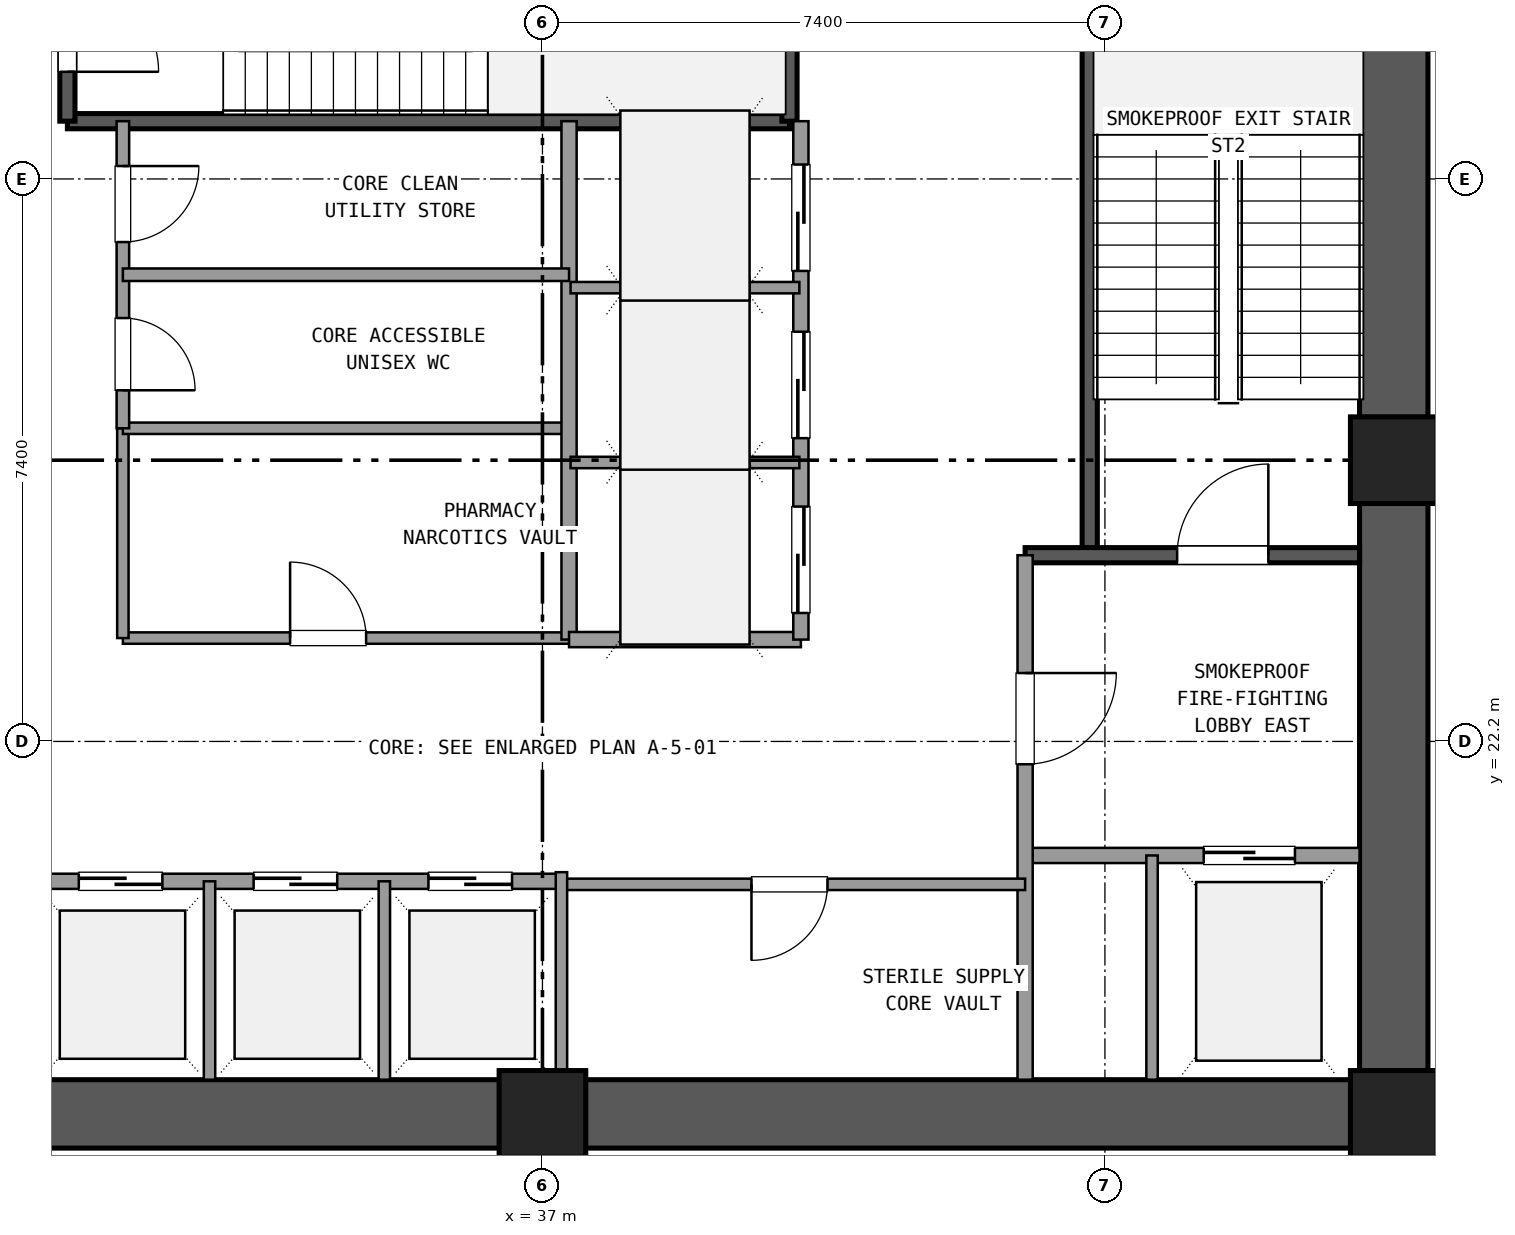
"""IFC4 building model, lengths in metres.
Left out: names, types, materials, properties, quantities, classifications, styles, units other than length and angle.
Written with IfcOpenShell. Run it as: python <this file> out.ifc"""

import sys

from ifc_helpers import new_model, si_unit, direction, frame, frame_2d, origin, origin_2d, place, context, subcontext, project, spatial, rectangle, extrude, element, fill, save


model = new_model("IFC4")
c1 = context("Model", 3, precision=1e-05, world=origin(), true_north=direction((0.0, 1.0)))
c2 = subcontext(c1, "Body", "Model", "MODEL_VIEW")
j1 = project(units=[si_unit("LENGTHUNIT", "METRE"), si_unit("PLANEANGLEUNIT", "RADIAN")], contexts=[c1])
p1 = place(None, origin())
s1 = spatial("IfcSite", under=j1, at=p1, CompositionType="ELEMENT")
p2 = place(p1, origin())
s2 = spatial("IfcBuilding", under=s1, at=p2, CompositionType="ELEMENT")
p3 = place(p2, frame((0.0, 0.0, -9.72)))
s3 = spatial("IfcBuildingStorey", under=s2, at=p3, CompositionType="ELEMENT", Elevation=-9.72)
for number, where, z_axis, x_axis in (
    (1, (37.0, 17.3, 0.0), (0.0, 0.0, 1.0), (1.0, 0.0, 0.0)),
    (2, (48.2, 17.3, 0.0), (0.0, 0.0, 1.0), (1.0, 0.0, 0.0)),
    (3, (48.2, 25.9, 0.0), (0.0, 0.0, 1.0), (1.0, 0.0, 0.0)),
):
    element("IfcColumn", number, at=place(p3, frame(where, z_axis=z_axis, x_axis=x_axis)), inside=s3, PredefinedType="COLUMN", context=c2, shape_type="SweptSolid", body=[
        extrude(rectangle(XDim=1.14, YDim=1.14, at=origin_2d()), origin(), (0.0, 0.0, 1.0), 4.86),
    ])
for number, where, z_axis, x_axis in (
    (4, (26.365, 17.3, 0.0), (0.0, 0.0, 1.0), (1.0, 0.0, 0.0)),
    (5, (37.565, 17.3, 0.0), (0.0, 0.0, 1.0), (1.0, 0.0, 0.0)),
):
    element("IfcWall", number, at=place(p3, frame(where, z_axis=z_axis, x_axis=x_axis)), inside=s3, PredefinedType="SHEAR", context=c2, shape_type="SweptSolid", body=[
        extrude(rectangle(XDim=10.07, YDim=0.9, at=frame_2d((5.035, 0.0))), origin(), (0.0, 0.0, 1.0), 4.56),
    ])
for number, where, z_axis, x_axis in (
    (6, (48.2, 17.865, 0.0), (0.0, 0.0, 1.0), (0.0, 1.0, 0.0)),
    (7, (48.2, 26.465, 0.0), (0.0, 0.0, 1.0), (0.0, 1.0, 0.0)),
):
    element("IfcWall", number, at=place(p3, frame(where, z_axis=z_axis, x_axis=x_axis)), inside=s3, PredefinedType="SHEAR", context=c2, shape_type="SweptSolid", body=[
        extrude(rectangle(XDim=7.47, YDim=0.9, at=frame_2d((3.735, 0.0))), origin(), (0.0, 0.0, 1.0), 4.56),
    ])
p4 = place(p3, frame((44.2, 24.65, 0.0), z_axis=(0.0, 0.0, 1.0), x_axis=(0.0, 1.0, 0.0)))
e8 = element("IfcWall", 8, at=p4, inside=s3, PredefinedType="SHEAR", context=c2, shape_type="SweptSolid", body=[
    extrude(rectangle(XDim=9.4, YDim=0.2, at=frame_2d((4.7, 0.0))), origin(), (0.0, 0.0, 1.0), 4.56),
])
p5 = place(p3, frame((43.35, 24.65, 0.0), z_axis=(0.0, 0.0, 1.0), x_axis=(1.0, 0.0, 0.0)))
e9 = element("IfcWall", 9, at=p5, inside=s3, PredefinedType="SHEAR", context=c2, shape_type="SweptSolid", body=[
    extrude(rectangle(XDim=4.4, YDim=0.2, at=frame_2d((2.2, 0.0))), origin(), (0.0, 0.0, 1.0), 4.56),
])
p6 = place(p5, frame((2.0, 0.0, 0.0)))
e10 = element("IfcOpeningElement", 10, at=p6, cuts=e9, PredefinedType="OPENING", context=c2, shape_type="SweptSolid", body=[
    extrude(rectangle(XDim=1.2, YDim=2.15, at=frame_2d((0.6, 1.075))), frame((0.0, 0.11, 0.0), z_axis=(0.0, -1.0, 0.0), x_axis=(1.0, 0.0, 0.0)), (0.0, 0.0, 1.0), 0.22),
])
p7 = place(p3, frame((30.75, 30.36, 0.0), z_axis=(0.0, 0.0, 1.0), x_axis=(1.0, 0.0, 0.0)))
e11 = element("IfcWall", 11, at=p7, inside=s3, PredefinedType="SHEAR", context=c2, shape_type="SweptSolid", body=[
    extrude(rectangle(XDim=9.5, YDim=0.2, at=frame_2d((4.75, 0.0))), origin(), (0.0, 0.0, 1.0), 4.56),
])
p8 = place(p3, frame((30.75, 30.36, 0.0), z_axis=(0.0, 0.0, 1.0), x_axis=(0.0, 1.0, 0.0)))
e12 = element("IfcWall", 12, at=p8, inside=s3, PredefinedType="SHEAR", context=c2, shape_type="SweptSolid", body=[
    extrude(rectangle(XDim=3.69, YDim=0.2, at=frame_2d((1.845, 0.0))), origin(), (0.0, 0.0, 1.0), 4.56),
])
p9 = place(p8, frame((0.65, 0.0, 0.0)))
e13 = element("IfcOpeningElement", 13, at=p9, cuts=e12, PredefinedType="OPENING", context=c2, shape_type="SweptSolid", body=[
    extrude(rectangle(XDim=1.2, YDim=2.15, at=frame_2d((0.6, 1.075))), frame((0.0, 0.11, 0.0), z_axis=(0.0, -1.0, 0.0), x_axis=(1.0, 0.0, 0.0)), (0.0, 0.0, 1.0), 0.22),
])
p10 = place(p3, frame((40.25, 30.36, 0.0), z_axis=(0.0, 0.0, 1.0), x_axis=(0.0, 1.0, 0.0)))
e14 = element("IfcWall", 14, at=p10, inside=s3, PredefinedType="SHEAR", context=c2, shape_type="SweptSolid", body=[
    extrude(rectangle(XDim=3.69, YDim=0.2, at=frame_2d((1.845, 0.0))), origin(), (0.0, 0.0, 1.0), 4.56),
])
p11 = place(p3, frame((43.35, 20.7, 0.0), z_axis=(0.0, 0.0, 1.0), x_axis=(1.0, 0.0, 0.0)))
e15 = element("IfcWall", 15, at=p11, inside=s3, PredefinedType="SOLIDWALL", context=c2, shape_type="SweptSolid", body=[
    extrude(rectangle(XDim=4.4, YDim=0.2, at=frame_2d((2.2, 0.0))), origin(), (0.0, 0.0, 1.0), 3.85),
])
p12 = place(p11, frame((2.35, 0.0, 0.0)))
e16 = element("IfcOpeningElement", 16, at=p12, cuts=e15, PredefinedType="OPENING", context=c2, shape_type="SweptSolid", body=[
    extrude(rectangle(XDim=1.2, YDim=2.15, at=frame_2d((0.6, 1.075))), frame((0.0, 0.11, 0.0), z_axis=(0.0, -1.0, 0.0), x_axis=(1.0, 0.0, 0.0)), (0.0, 0.0, 1.0), 0.22),
])
p13 = place(p3, frame((43.35, 17.75, 0.0), z_axis=(0.0, 0.0, 1.0), x_axis=(0.0, 1.0, 0.0)))
e17 = element("IfcWall", 17, at=p13, inside=s3, PredefinedType="SOLIDWALL", context=c2, shape_type="SweptSolid", body=[
    extrude(rectangle(XDim=6.9, YDim=0.2, at=frame_2d((3.45, 0.0))), origin(), (0.0, 0.0, 1.0), 3.85),
])
p14 = place(p13, frame((4.15, 0.0, 0.0)))
e18 = element("IfcOpeningElement", 18, at=p14, cuts=e17, PredefinedType="OPENING", context=c2, shape_type="SweptSolid", body=[
    extrude(rectangle(XDim=1.2, YDim=2.15, at=frame_2d((0.6, 1.075))), frame((0.0, 0.11, 0.0), z_axis=(0.0, -1.0, 0.0), x_axis=(1.0, 0.0, 0.0)), (0.0, 0.0, 1.0), 0.22),
])
p15 = place(p3, frame((45.02, 17.75, 0.0), z_axis=(0.0, 0.0, 1.0), x_axis=(0.0, 1.0, 0.0)))
e19 = element("IfcWall", 19, at=p15, inside=s3, PredefinedType="PARTITIONING", context=c2, shape_type="SweptSolid", body=[
    extrude(rectangle(XDim=2.95, YDim=0.15, at=frame_2d((1.475, 0.0))), origin(), (0.0, 0.0, 1.0), 3.85),
])
p16 = place(p3, frame((30.25, 20.36, 0.0), z_axis=(0.0, 0.0, 1.0), x_axis=(1.0, 0.0, 0.0)))
e20 = element("IfcWall", 20, at=p16, inside=s3, PredefinedType="SOLIDWALL", context=c2, shape_type="SweptSolid", body=[
    extrude(rectangle(XDim=7.0, YDim=0.2, at=frame_2d((3.5, 0.0))), origin(), (0.0, 0.0, 1.0), 3.85),
])
p17 = place(p16, frame((0.65, 0.0, 0.0)))
e21 = element("IfcOpeningElement", 21, at=p17, cuts=e20, PredefinedType="OPENING", context=c2, shape_type="SweptSolid", body=[
    extrude(rectangle(XDim=1.1, YDim=2.15, at=frame_2d((0.55, 1.075))), frame((0.0, 0.11, 0.0), z_axis=(0.0, -1.0, 0.0), x_axis=(1.0, 0.0, 0.0)), (0.0, 0.0, 1.0), 0.22),
])
p18 = place(p16, frame((2.95, 0.0, 0.0)))
e22 = element("IfcOpeningElement", 22, at=p18, cuts=e20, PredefinedType="OPENING", context=c2, shape_type="SweptSolid", body=[
    extrude(rectangle(XDim=1.1, YDim=2.15, at=frame_2d((0.55, 1.075))), frame((0.0, 0.11, 0.0), z_axis=(0.0, -1.0, 0.0), x_axis=(1.0, 0.0, 0.0)), (0.0, 0.0, 1.0), 0.22),
])
p19 = place(p16, frame((5.25, 0.0, 0.0)))
e23 = element("IfcOpeningElement", 23, at=p19, cuts=e20, PredefinedType="OPENING", context=c2, shape_type="SweptSolid", body=[
    extrude(rectangle(XDim=1.1, YDim=2.15, at=frame_2d((0.55, 1.075))), frame((0.0, 0.11, 0.0), z_axis=(0.0, -1.0, 0.0), x_axis=(1.0, 0.0, 0.0)), (0.0, 0.0, 1.0), 0.22),
])
for number, where, z_axis, x_axis in (
    (24, (32.62, 17.75, 0.0), (0.0, 0.0, 1.0), (0.0, 1.0, 0.0)),
    (25, (34.92, 17.75, 0.0), (0.0, 0.0, 1.0), (0.0, 1.0, 0.0)),
):
    element("IfcWall", number, at=place(p3, frame(where, z_axis=z_axis, x_axis=x_axis)), inside=s3, PredefinedType="PARTITIONING", context=c2, shape_type="SweptSolid", body=[
        extrude(rectangle(XDim=2.61, YDim=0.15, at=frame_2d((1.305, 0.0))), origin(), (0.0, 0.0, 1.0), 3.85),
    ])
p20 = place(p3, frame((37.25, 20.32, 0.0), z_axis=(0.0, 0.0, 1.0), x_axis=(1.0, 0.0, 0.0)))
e26 = element("IfcWall", 26, at=p20, inside=s3, PredefinedType="PARTITIONING", context=c2, shape_type="SweptSolid", body=[
    extrude(rectangle(XDim=6.1, YDim=0.15, at=frame_2d((3.05, 0.0))), origin(), (0.0, 0.0, 1.0), 3.85),
])
p21 = place(p20, frame((2.5, 0.0, 0.0)))
e27 = element("IfcOpeningElement", 27, at=p21, cuts=e26, PredefinedType="OPENING", context=c2, shape_type="SweptSolid", body=[
    extrude(rectangle(XDim=1.0, YDim=2.15, at=frame_2d((0.5, 1.075))), frame((0.0, 0.085, 0.0), z_axis=(0.0, -1.0, 0.0), x_axis=(1.0, 0.0, 0.0)), (0.0, 0.0, 1.0), 0.17),
])
p22 = place(p3, frame((37.25, 17.75, 0.0), z_axis=(0.0, 0.0, 1.0), x_axis=(0.0, 1.0, 0.0)))
e28 = element("IfcWall", 28, at=p22, inside=s3, PredefinedType="PARTITIONING", context=c2, shape_type="SweptSolid", body=[
    extrude(rectangle(XDim=2.73, YDim=0.15, at=frame_2d((1.365, 0.0))), origin(), (0.0, 0.0, 1.0), 3.85),
])
p23 = place(p3, frame((31.48, 23.56, 0.0), z_axis=(0.0, 0.0, 1.0), x_axis=(1.0, 0.0, 0.0)))
e29 = element("IfcWall", 29, at=p23, inside=s3, PredefinedType="PARTITIONING", context=c2, shape_type="SweptSolid", body=[
    extrude(rectangle(XDim=5.89, YDim=0.15, at=frame_2d((2.945, 0.0))), origin(), (0.0, 0.0, 1.0), 3.85),
])
p24 = place(p23, frame((2.2, 0.0, 0.0)))
e30 = element("IfcOpeningElement", 30, at=p24, cuts=e29, PredefinedType="OPENING", context=c2, shape_type="SweptSolid", body=[
    extrude(rectangle(XDim=1.0, YDim=2.15, at=frame_2d((0.5, 1.075))), frame((0.0, 0.085, 0.0), z_axis=(0.0, -1.0, 0.0), x_axis=(1.0, 0.0, 0.0)), (0.0, 0.0, 1.0), 0.17),
])
p25 = place(p3, frame((31.48, 23.56, 0.0), z_axis=(0.0, 0.0, 1.0), x_axis=(0.0, 1.0, 0.0)))
e31 = element("IfcWall", 31, at=p25, inside=s3, PredefinedType="PARTITIONING", context=c2, shape_type="SweptSolid", body=[
    extrude(rectangle(XDim=2.76, YDim=0.15, at=frame_2d((1.38, 0.0))), origin(), (0.0, 0.0, 1.0), 3.85),
])
p26 = place(p3, frame((31.48, 26.32, 0.0), z_axis=(0.0, 0.0, 1.0), x_axis=(1.0, 0.0, 0.0)))
e32 = element("IfcWall", 32, at=p26, inside=s3, PredefinedType="PARTITIONING", context=c2, shape_type="SweptSolid", body=[
    extrude(rectangle(XDim=5.89, YDim=0.15, at=frame_2d((2.945, 0.0))), origin(), (0.0, 0.0, 1.0), 3.85),
])
p27 = place(p3, frame((37.35, 23.54, 0.0), z_axis=(0.0, 0.0, 1.0), x_axis=(0.0, 1.0, 0.0)))
e33 = element("IfcWall", 33, at=p27, inside=s3, PredefinedType="SOLIDWALL", context=c2, shape_type="SweptSolid", body=[
    extrude(rectangle(XDim=6.82, YDim=0.2, at=frame_2d((3.41, 0.0))), origin(), (0.0, 0.0, 1.0), 3.85),
])
p28 = place(p3, frame((37.35, 23.54, 0.0), z_axis=(0.0, 0.0, 1.0), x_axis=(1.0, 0.0, 0.0)))
e34 = element("IfcWall", 34, at=p28, inside=s3, PredefinedType="SOLIDWALL", context=c2, shape_type="SweptSolid", body=[
    extrude(rectangle(XDim=3.05, YDim=0.2, at=frame_2d((1.525, 0.0))), origin(), (0.0, 0.0, 1.0), 3.85),
])
p29 = place(p3, frame((40.4, 23.54, 0.0), z_axis=(0.0, 0.0, 1.0), x_axis=(0.0, 1.0, 0.0)))
e35 = element("IfcWall", 35, at=p29, inside=s3, PredefinedType="SOLIDWALL", context=c2, shape_type="SweptSolid", body=[
    extrude(rectangle(XDim=6.82, YDim=0.2, at=frame_2d((3.41, 0.0))), origin(), (0.0, 0.0, 1.0), 3.85),
])
p30 = place(p29, frame((0.35, 0.0, 0.0)))
e36 = element("IfcOpeningElement", 36, at=p30, cuts=e35, PredefinedType="OPENING", context=c2, shape_type="SweptSolid", body=[
    extrude(rectangle(XDim=1.4, YDim=2.2, at=frame_2d((0.7, 1.1))), frame((0.0, 0.11, 0.0), z_axis=(0.0, -1.0, 0.0), x_axis=(1.0, 0.0, 0.0)), (0.0, 0.0, 1.0), 0.22),
])
p31 = place(p29, frame((2.65, 0.0, 0.0)))
e37 = element("IfcOpeningElement", 37, at=p31, cuts=e35, PredefinedType="OPENING", context=c2, shape_type="SweptSolid", body=[
    extrude(rectangle(XDim=1.4, YDim=2.2, at=frame_2d((0.7, 1.1))), frame((0.0, 0.11, 0.0), z_axis=(0.0, -1.0, 0.0), x_axis=(1.0, 0.0, 0.0)), (0.0, 0.0, 1.0), 0.22),
])
p32 = place(p29, frame((4.85, 0.0, 0.0)))
e38 = element("IfcOpeningElement", 38, at=p32, cuts=e35, PredefinedType="OPENING", context=c2, shape_type="SweptSolid", body=[
    extrude(rectangle(XDim=1.4, YDim=2.2, at=frame_2d((0.7, 1.1))), frame((0.0, 0.11, 0.0), z_axis=(0.0, -1.0, 0.0), x_axis=(1.0, 0.0, 0.0)), (0.0, 0.0, 1.0), 0.22),
])
for number, where, z_axis, x_axis in (
    (39, (37.37, 25.87, 0.0), (0.0, 0.0, 1.0), (1.0, 0.0, 0.0)),
    (40, (37.37, 28.17, 0.0), (0.0, 0.0, 1.0), (1.0, 0.0, 0.0)),
):
    element("IfcWall", number, at=place(p3, frame(where, z_axis=z_axis, x_axis=x_axis)), inside=s3, PredefinedType="PARTITIONING", context=c2, shape_type="SweptSolid", body=[
        extrude(rectangle(XDim=3.01, YDim=0.15, at=frame_2d((1.505, 0.0))), origin(), (0.0, 0.0, 1.0), 3.85),
    ])
p33 = place(p3, frame((31.48, 26.32, 0.0), z_axis=(0.0, 0.0, 1.0), x_axis=(0.0, 1.0, 0.0)))
e41 = element("IfcWall", 41, at=p33, inside=s3, PredefinedType="PLUMBINGWALL", context=c2, shape_type="SweptSolid", body=[
    extrude(rectangle(XDim=4.04, YDim=0.165, at=frame_2d((2.02, 0.0))), origin(), (0.0, 0.0, 1.0), 3.85),
])
p34 = place(p33, frame((0.5, 0.0, 0.0)))
e42 = element("IfcOpeningElement", 42, at=p34, cuts=e41, PredefinedType="OPENING", context=c2, shape_type="SweptSolid", body=[
    extrude(rectangle(XDim=0.95, YDim=2.1, at=frame_2d((0.475, 1.05))), frame((0.0, 0.093, 0.0), z_axis=(0.0, -1.0, 0.0), x_axis=(1.0, 0.0, 0.0)), (0.0, 0.0, 1.0), 0.185),
])
p35 = place(p33, frame((2.45, 0.0, 0.0)))
e43 = element("IfcOpeningElement", 43, at=p35, cuts=e41, PredefinedType="OPENING", context=c2, shape_type="SweptSolid", body=[
    extrude(rectangle(XDim=1.0, YDim=2.15, at=frame_2d((0.5, 1.075))), frame((0.0, 0.093, 0.0), z_axis=(0.0, -1.0, 0.0), x_axis=(1.0, 0.0, 0.0)), (0.0, 0.0, 1.0), 0.185),
])
p36 = place(p3, frame((31.48, 28.34, 0.0), z_axis=(0.0, 0.0, 1.0), x_axis=(1.0, 0.0, 0.0)))
e44 = element("IfcWall", 44, at=p36, inside=s3, PredefinedType="PLUMBINGWALL", context=c2, shape_type="SweptSolid", body=[
    extrude(rectangle(XDim=5.87, YDim=0.165, at=frame_2d((2.935, 0.0))), origin(), (0.0, 0.0, 1.0), 3.85),
])
p37 = place(p6, origin())
e45 = element("IfcDoor", 45, at=p37, inside=s3, OperationType="SINGLE_SWING_RIGHT", PredefinedType="DOOR", context=c2, shape_type="SweptSolid", body=[
    extrude(rectangle(XDim=1.2, YDim=2.15, at=frame_2d((0.6, 1.075))), frame((0.0, 0.025, 0.0), z_axis=(0.0, -1.0, 0.0), x_axis=(1.0, 0.0, 0.0)), (0.0, 0.0, 1.0), 0.05),
])
fill(e10, e45)
p38 = place(p12, origin())
e46 = element("IfcDoor", 46, at=p38, inside=s3, OperationType="SLIDING_TO_RIGHT", PredefinedType="DOOR", context=c2, shape_type="SweptSolid", body=[
    extrude(rectangle(XDim=1.2, YDim=2.15, at=frame_2d((0.6, 1.075))), frame((0.0, 0.025, 0.0), z_axis=(0.0, -1.0, 0.0), x_axis=(1.0, 0.0, 0.0)), (0.0, 0.0, 1.0), 0.05),
])
fill(e16, e46)
p39 = place(p14, frame((1.2, 0.0, 0.0), z_axis=(0.0, 0.0, 1.0), x_axis=(-1.0, 0.0, 0.0)))
e47 = element("IfcDoor", 47, at=p39, inside=s3, OperationType="SINGLE_SWING_RIGHT", PredefinedType="DOOR", context=c2, shape_type="SweptSolid", body=[
    extrude(rectangle(XDim=1.2, YDim=2.15, at=frame_2d((0.6, 1.075))), frame((0.0, 0.025, 0.0), z_axis=(0.0, -1.0, 0.0), x_axis=(1.0, 0.0, 0.0)), (0.0, 0.0, 1.0), 0.05),
])
fill(e18, e47)
p40 = place(p17, origin())
e48 = element("IfcDoor", 48, at=p40, inside=s3, OperationType="SLIDING_TO_LEFT", PredefinedType="DOOR", context=c2, shape_type="SweptSolid", body=[
    extrude(rectangle(XDim=1.1, YDim=2.15, at=frame_2d((0.55, 1.075))), frame((0.0, 0.025, 0.0), z_axis=(0.0, -1.0, 0.0), x_axis=(1.0, 0.0, 0.0)), (0.0, 0.0, 1.0), 0.05),
])
fill(e21, e48)
p41 = place(p18, origin())
e49 = element("IfcDoor", 49, at=p41, inside=s3, OperationType="SLIDING_TO_LEFT", PredefinedType="DOOR", context=c2, shape_type="SweptSolid", body=[
    extrude(rectangle(XDim=1.1, YDim=2.15, at=frame_2d((0.55, 1.075))), frame((0.0, 0.025, 0.0), z_axis=(0.0, -1.0, 0.0), x_axis=(1.0, 0.0, 0.0)), (0.0, 0.0, 1.0), 0.05),
])
fill(e22, e49)
p42 = place(p19, origin())
e50 = element("IfcDoor", 50, at=p42, inside=s3, OperationType="SLIDING_TO_LEFT", PredefinedType="DOOR", context=c2, shape_type="SweptSolid", body=[
    extrude(rectangle(XDim=1.1, YDim=2.15, at=frame_2d((0.55, 1.075))), frame((0.0, 0.025, 0.0), z_axis=(0.0, -1.0, 0.0), x_axis=(1.0, 0.0, 0.0)), (0.0, 0.0, 1.0), 0.05),
])
fill(e23, e50)
p43 = place(p21, frame((1.0, 0.0, 0.0), z_axis=(0.0, 0.0, 1.0), x_axis=(-1.0, 0.0, 0.0)))
e51 = element("IfcDoor", 51, at=p43, inside=s3, OperationType="SINGLE_SWING_LEFT", PredefinedType="DOOR", context=c2, shape_type="SweptSolid", body=[
    extrude(rectangle(XDim=1.0, YDim=2.15, at=frame_2d((0.5, 1.075))), frame((0.0, 0.025, 0.0), z_axis=(0.0, -1.0, 0.0), x_axis=(1.0, 0.0, 0.0)), (0.0, 0.0, 1.0), 0.05),
])
fill(e27, e51)
p44 = place(p24, origin())
e52 = element("IfcDoor", 52, at=p44, inside=s3, OperationType="SINGLE_SWING_LEFT", PredefinedType="DOOR", context=c2, shape_type="SweptSolid", body=[
    extrude(rectangle(XDim=1.0, YDim=2.15, at=frame_2d((0.5, 1.075))), frame((0.0, 0.025, 0.0), z_axis=(0.0, -1.0, 0.0), x_axis=(1.0, 0.0, 0.0)), (0.0, 0.0, 1.0), 0.05),
])
fill(e30, e52)
p45 = place(p30, origin())
e53 = element("IfcDoor", 53, at=p45, inside=s3, OperationType="SLIDING_TO_LEFT", PredefinedType="DOOR", context=c2, shape_type="SweptSolid", body=[
    extrude(rectangle(XDim=1.4, YDim=2.2, at=frame_2d((0.7, 1.1))), frame((0.0, 0.025, 0.0), z_axis=(0.0, -1.0, 0.0), x_axis=(1.0, 0.0, 0.0)), (0.0, 0.0, 1.0), 0.05),
])
fill(e36, e53)
p46 = place(p31, origin())
e54 = element("IfcDoor", 54, at=p46, inside=s3, OperationType="SLIDING_TO_LEFT", PredefinedType="DOOR", context=c2, shape_type="SweptSolid", body=[
    extrude(rectangle(XDim=1.4, YDim=2.2, at=frame_2d((0.7, 1.1))), frame((0.0, 0.025, 0.0), z_axis=(0.0, -1.0, 0.0), x_axis=(1.0, 0.0, 0.0)), (0.0, 0.0, 1.0), 0.05),
])
fill(e37, e54)
p47 = place(p32, origin())
e55 = element("IfcDoor", 55, at=p47, inside=s3, OperationType="SLIDING_TO_RIGHT", PredefinedType="DOOR", context=c2, shape_type="SweptSolid", body=[
    extrude(rectangle(XDim=1.4, YDim=2.2, at=frame_2d((0.7, 1.1))), frame((0.0, 0.025, 0.0), z_axis=(0.0, -1.0, 0.0), x_axis=(1.0, 0.0, 0.0)), (0.0, 0.0, 1.0), 0.05),
])
fill(e38, e55)
p48 = place(p9, frame((1.2, 0.0, 0.0), z_axis=(0.0, 0.0, 1.0), x_axis=(-1.0, 0.0, 0.0)))
e56 = element("IfcDoor", 56, at=p48, inside=s3, OperationType="SINGLE_SWING_LEFT", PredefinedType="DOOR", context=c2, shape_type="SweptSolid", body=[
    extrude(rectangle(XDim=1.2, YDim=2.15, at=frame_2d((0.6, 1.075))), frame((0.0, 0.025, 0.0), z_axis=(0.0, -1.0, 0.0), x_axis=(1.0, 0.0, 0.0)), (0.0, 0.0, 1.0), 0.05),
])
fill(e13, e56)
p49 = place(p34, frame((0.95, 0.0, 0.0), z_axis=(0.0, 0.0, 1.0), x_axis=(-1.0, 0.0, 0.0)))
e57 = element("IfcDoor", 57, at=p49, inside=s3, OperationType="SINGLE_SWING_LEFT", PredefinedType="DOOR", context=c2, shape_type="SweptSolid", body=[
    extrude(rectangle(XDim=0.95, YDim=2.1, at=frame_2d((0.475, 1.05))), frame((0.0, 0.025, 0.0), z_axis=(0.0, -1.0, 0.0), x_axis=(1.0, 0.0, 0.0)), (0.0, 0.0, 1.0), 0.05),
])
fill(e42, e57)
p50 = place(p35, frame((1.0, 0.0, 0.0), z_axis=(0.0, 0.0, 1.0), x_axis=(-1.0, 0.0, 0.0)))
e58 = element("IfcDoor", 58, at=p50, inside=s3, OperationType="SINGLE_SWING_RIGHT", PredefinedType="DOOR", context=c2, shape_type="SweptSolid", body=[
    extrude(rectangle(XDim=1.0, YDim=2.15, at=frame_2d((0.5, 1.075))), frame((0.0, 0.025, 0.0), z_axis=(0.0, -1.0, 0.0), x_axis=(1.0, 0.0, 0.0)), (0.0, 0.0, 1.0), 0.05),
])
fill(e43, e58)
save(model, sys.argv[1])
